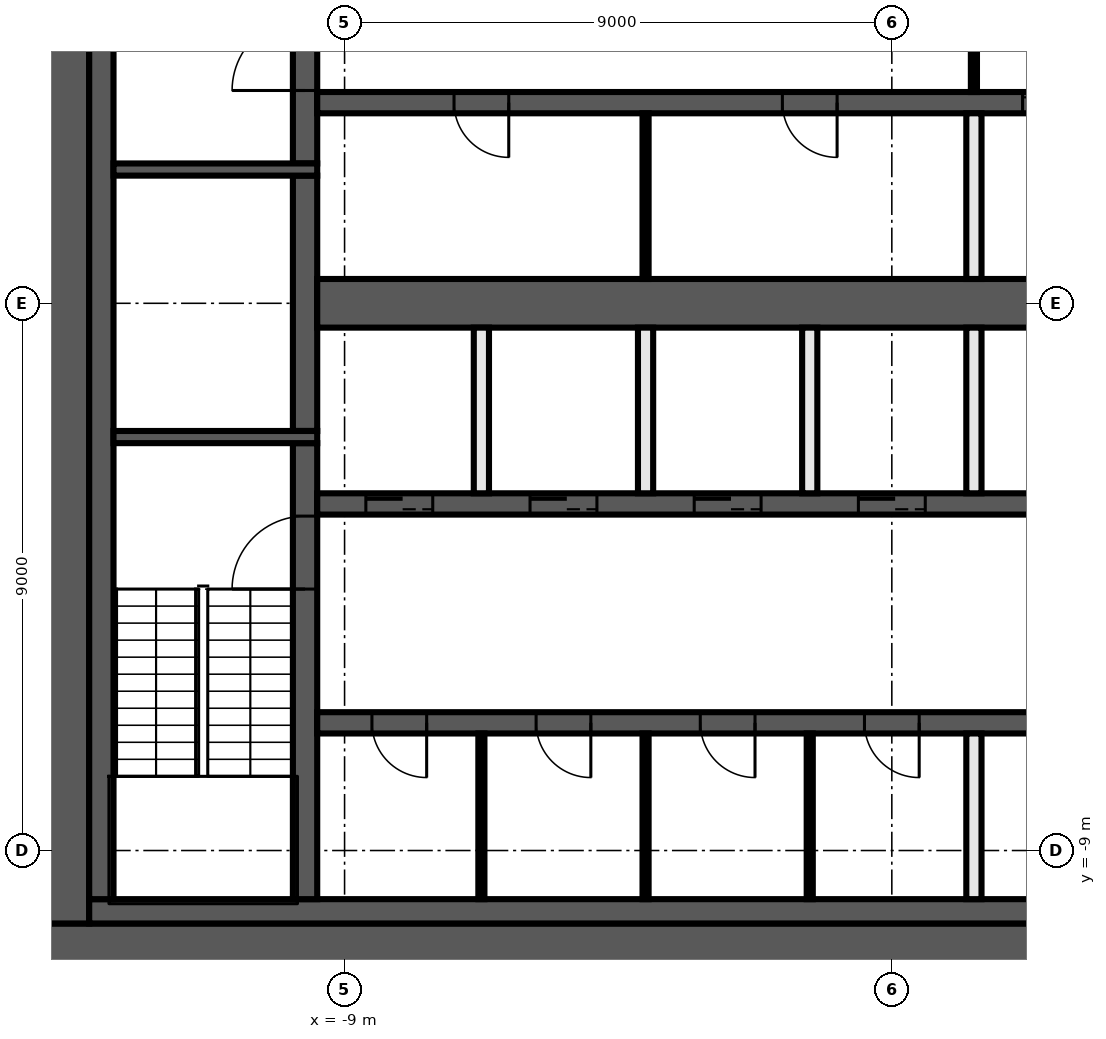
"""IFC4 building model, lengths in metres.
Left out: names, types, materials, properties, quantities, classifications, styles, units other than length and angle.
Written with IfcOpenShell. Run it as: python <this file> out.ifc"""

import sys

from ifc_helpers import new_model, si_unit, direction, frame, frame_2d, origin, place, context, subcontext, project, spatial, rectangle, extrude, element, fill, save


model = new_model("IFC4")
c1 = context("Model", 3, precision=1e-05, world=origin(), true_north=direction((0.0, 1.0)))
c2 = subcontext(c1, "Body", "Model", "MODEL_VIEW")
j1 = project(units=[si_unit("LENGTHUNIT", "METRE"), si_unit("PLANEANGLEUNIT", "RADIAN")], contexts=[c1])
p1 = place(None, origin())
s1 = spatial("IfcSite", under=j1, at=p1, CompositionType="ELEMENT")
p2 = place(p1, origin())
s2 = spatial("IfcBuilding", under=s1, at=p2, CompositionType="ELEMENT")
p3 = place(p2, frame((0.0, 0.0, 207.2)))
s3 = spatial("IfcBuildingStorey", under=s2, at=p3, CompositionType="ELEMENT", Elevation=207.2)
p4 = place(p3, frame((14.0, -10.6, 0.0), z_axis=(0.0, 0.0, 1.0), x_axis=(-1.0, 0.0, 0.0)))
e1 = element("IfcWall", 1, at=p4, inside=s3, PredefinedType="SHEAR", context=c2, shape_type="SweptSolid", body=[
    extrude(rectangle(XDim=28.0, YDim=0.8, at=frame_2d((14.0, 0.0))), origin(), (0.0, 0.0, 1.0), 3.82),
])
p5 = place(p4, frame((5.1, 0.0, 0.0)))
e2 = element("IfcOpeningElement", 2, at=p5, cuts=e1, PredefinedType="OPENING", context=c2, shape_type="SweptSolid", body=[
    extrude(rectangle(XDim=1.6, YDim=2.1, at=frame_2d((0.8, 1.05))), frame((0.0, 0.41, 0.0), z_axis=(0.0, -1.0, 0.0), x_axis=(1.0, 0.0, 0.0)), (0.0, 0.0, 1.0), 0.82),
])
p6 = place(p3, frame((-13.6, -10.2, 0.0), z_axis=(0.0, 0.0, 1.0), x_axis=(0.0, 1.0, 0.0)))
e3 = element("IfcWall", 3, at=p6, inside=s3, PredefinedType="SHEAR", context=c2, shape_type="SweptSolid", body=[
    extrude(rectangle(XDim=20.4, YDim=0.8, at=frame_2d((10.2, 0.0))), origin(), (0.0, 0.0, 1.0), 3.82),
])
p7 = place(p3, frame((6.9, -10.0, 0.0), z_axis=(0.0, 0.0, 1.0), x_axis=(-1.0, 0.0, 0.0)))
e4 = element("IfcWall", 4, at=p7, inside=s3, PredefinedType="SHEAR", context=c2, shape_type="SweptSolid", body=[
    extrude(rectangle(XDim=20.1, YDim=0.4, at=frame_2d((10.05, 0.0))), origin(), (0.0, 0.0, 1.0), 3.82),
])
p8 = place(p3, frame((-13.0, -9.8, 0.0), z_axis=(0.0, 0.0, 1.0), x_axis=(0.0, 1.0, 0.0)))
e5 = element("IfcWall", 5, at=p8, inside=s3, PredefinedType="SHEAR", context=c2, shape_type="SweptSolid", body=[
    extrude(rectangle(XDim=19.6, YDim=0.4, at=frame_2d((9.8, 0.0))), origin(), (0.0, 0.0, 1.0), 3.82),
])
p9 = place(p3, frame((-9.65, -9.8, 0.0), z_axis=(0.0, 0.0, 1.0), x_axis=(0.0, 1.0, 0.0)))
e6 = element("IfcWall", 6, at=p9, inside=s3, PredefinedType="SHEAR", context=c2, shape_type="SweptSolid", body=[
    extrude(rectangle(XDim=7.5, YDim=0.4, at=frame_2d((3.75, 0.0))), origin(), (0.0, 0.0, 1.0), 3.82),
])
p10 = place(p9, frame((5.1, 0.0, 0.0)))
e7 = element("IfcOpeningElement", 7, at=p10, cuts=e6, PredefinedType="OPENING", context=c2, shape_type="SweptSolid", body=[
    extrude(rectangle(XDim=1.2, YDim=2.1, at=frame_2d((0.6, 1.05))), frame((0.0, 0.21, 0.0), z_axis=(0.0, -1.0, 0.0), x_axis=(1.0, 0.0, 0.0)), (0.0, 0.0, 1.0), 0.42),
])
p11 = place(p3, frame((-9.65, -2.1, 0.0), z_axis=(0.0, 0.0, 1.0), x_axis=(0.0, 1.0, 0.0)))
e8 = element("IfcWall", 8, at=p11, inside=s3, PredefinedType="SHEAR", context=c2, shape_type="SweptSolid", body=[
    extrude(rectangle(XDim=4.2, YDim=0.4, at=frame_2d((2.1, 0.0))), origin(), (0.0, 0.0, 1.0), 3.82),
])
p12 = place(p3, frame((-9.65, 2.3, 0.0), z_axis=(0.0, 0.0, 1.0), x_axis=(0.0, 1.0, 0.0)))
e9 = element("IfcWall", 9, at=p12, inside=s3, PredefinedType="SHEAR", context=c2, shape_type="SweptSolid", body=[
    extrude(rectangle(XDim=7.5, YDim=0.4, at=frame_2d((3.75, 0.0))), origin(), (0.0, 0.0, 1.0), 3.82),
])
p13 = place(p12, frame((1.2, 0.0, 0.0)))
e10 = element("IfcOpeningElement", 10, at=p13, cuts=e9, PredefinedType="OPENING", context=c2, shape_type="SweptSolid", body=[
    extrude(rectangle(XDim=1.2, YDim=2.1, at=frame_2d((0.6, 1.05))), frame((0.0, 0.21, 0.0), z_axis=(0.0, -1.0, 0.0), x_axis=(1.0, 0.0, 0.0)), (0.0, 0.0, 1.0), 0.42),
])
for number, where, z_axis, x_axis in (
    (11, (-9.45, 2.2, 0.0), (0.0, 0.0, 1.0), (-1.0, 0.0, 0.0)),
    (12, (-9.45, -2.2, 0.0), (0.0, 0.0, 1.0), (-1.0, 0.0, 0.0)),
):
    element("IfcWall", number, at=place(p3, frame(where, z_axis=z_axis, x_axis=x_axis)), inside=s3, PredefinedType="SHEAR", context=c2, shape_type="SweptSolid", body=[
        extrude(rectangle(XDim=3.35, YDim=0.2, at=frame_2d((1.675, 0.0))), origin(), (0.0, 0.0, 1.0), 3.82),
    ])
p14 = place(p3, frame((9.45, 3.3, 0.0), z_axis=(0.0, 0.0, 1.0), x_axis=(-1.0, 0.0, 0.0)))
e13 = element("IfcWall", 13, at=p14, inside=s3, PredefinedType="SHEAR", context=c2, shape_type="SweptSolid", body=[
    extrude(rectangle(XDim=18.9, YDim=0.35, at=frame_2d((9.45, 0.0))), origin(), (0.0, 0.0, 1.0), 3.82),
])
p15 = place(p14, frame((6.2, 0.0, 0.0)))
e14 = element("IfcOpeningElement", 14, at=p15, cuts=e13, PredefinedType="OPENING", context=c2, shape_type="SweptSolid", body=[
    extrude(rectangle(XDim=1.1, YDim=2.1, at=frame_2d((0.55, 1.05))), frame((0.0, 0.185, 0.0), z_axis=(0.0, -1.0, 0.0), x_axis=(1.0, 0.0, 0.0)), (0.0, 0.0, 1.0), 0.37),
])
p16 = place(p14, frame((3.5, 0.0, 0.0)))
e15 = element("IfcOpeningElement", 15, at=p16, cuts=e13, PredefinedType="OPENING", context=c2, shape_type="SweptSolid", body=[
    extrude(rectangle(XDim=1.1, YDim=2.1, at=frame_2d((0.55, 1.05))), frame((0.0, 0.185, 0.0), z_axis=(0.0, -1.0, 0.0), x_axis=(1.0, 0.0, 0.0)), (0.0, 0.0, 1.0), 0.37),
])
p17 = place(p14, frame((0.9, 0.0, 0.0)))
e16 = element("IfcOpeningElement", 16, at=p17, cuts=e13, PredefinedType="OPENING", context=c2, shape_type="SweptSolid", body=[
    extrude(rectangle(XDim=0.9, YDim=2.1, at=frame_2d((0.45, 1.05))), frame((0.0, 0.185, 0.0), z_axis=(0.0, -1.0, 0.0), x_axis=(1.0, 0.0, 0.0)), (0.0, 0.0, 1.0), 0.37),
])
p18 = place(p14, frame((15.75, 0.0, 0.0)))
e17 = element("IfcOpeningElement", 17, at=p18, cuts=e13, PredefinedType="OPENING", context=c2, shape_type="SweptSolid", body=[
    extrude(rectangle(XDim=0.9, YDim=2.1, at=frame_2d((0.45, 1.05))), frame((0.0, 0.185, 0.0), z_axis=(0.0, -1.0, 0.0), x_axis=(1.0, 0.0, 0.0)), (0.0, 0.0, 1.0), 0.37),
])
p19 = place(p14, frame((10.35, 0.0, 0.0)))
e18 = element("IfcOpeningElement", 18, at=p19, cuts=e13, PredefinedType="OPENING", context=c2, shape_type="SweptSolid", body=[
    extrude(rectangle(XDim=0.9, YDim=2.1, at=frame_2d((0.45, 1.05))), frame((0.0, 0.185, 0.0), z_axis=(0.0, -1.0, 0.0), x_axis=(1.0, 0.0, 0.0)), (0.0, 0.0, 1.0), 0.37),
])
p20 = place(p3, frame((-9.45, -3.3, 0.0), z_axis=(0.0, 0.0, 1.0), x_axis=(1.0, 0.0, 0.0)))
e19 = element("IfcWall", 19, at=p20, inside=s3, PredefinedType="SHEAR", context=c2, shape_type="SweptSolid", body=[
    extrude(rectangle(XDim=18.9, YDim=0.35, at=frame_2d((9.45, 0.0))), origin(), (0.0, 0.0, 1.0), 3.82),
])
p21 = place(p20, frame((0.8, 0.0, 0.0)))
e20 = element("IfcOpeningElement", 20, at=p21, cuts=e19, PredefinedType="OPENING", context=c2, shape_type="SweptSolid", body=[
    extrude(rectangle(XDim=1.1, YDim=2.1, at=frame_2d((0.55, 1.05))), frame((0.0, 0.185, 0.0), z_axis=(0.0, -1.0, 0.0), x_axis=(1.0, 0.0, 0.0)), (0.0, 0.0, 1.0), 0.37),
])
p22 = place(p20, frame((3.5, 0.0, 0.0)))
e21 = element("IfcOpeningElement", 21, at=p22, cuts=e19, PredefinedType="OPENING", context=c2, shape_type="SweptSolid", body=[
    extrude(rectangle(XDim=1.1, YDim=2.1, at=frame_2d((0.55, 1.05))), frame((0.0, 0.185, 0.0), z_axis=(0.0, -1.0, 0.0), x_axis=(1.0, 0.0, 0.0)), (0.0, 0.0, 1.0), 0.37),
])
p23 = place(p20, frame((6.2, 0.0, 0.0)))
e22 = element("IfcOpeningElement", 22, at=p23, cuts=e19, PredefinedType="OPENING", context=c2, shape_type="SweptSolid", body=[
    extrude(rectangle(XDim=1.1, YDim=2.1, at=frame_2d((0.55, 1.05))), frame((0.0, 0.185, 0.0), z_axis=(0.0, -1.0, 0.0), x_axis=(1.0, 0.0, 0.0)), (0.0, 0.0, 1.0), 0.37),
])
p24 = place(p20, frame((8.9, 0.0, 0.0)))
e23 = element("IfcOpeningElement", 23, at=p24, cuts=e19, PredefinedType="OPENING", context=c2, shape_type="SweptSolid", body=[
    extrude(rectangle(XDim=1.1, YDim=2.1, at=frame_2d((0.55, 1.05))), frame((0.0, 0.185, 0.0), z_axis=(0.0, -1.0, 0.0), x_axis=(1.0, 0.0, 0.0)), (0.0, 0.0, 1.0), 0.37),
])
p25 = place(p20, frame((17.0, 0.0, 0.0)))
e24 = element("IfcOpeningElement", 24, at=p25, cuts=e19, PredefinedType="OPENING", context=c2, shape_type="SweptSolid", body=[
    extrude(rectangle(XDim=1.1, YDim=2.1, at=frame_2d((0.55, 1.05))), frame((0.0, 0.185, 0.0), z_axis=(0.0, -1.0, 0.0), x_axis=(1.0, 0.0, 0.0)), (0.0, 0.0, 1.0), 0.37),
])
p26 = place(p20, frame((11.7, 0.0, 0.0)))
e25 = element("IfcOpeningElement", 25, at=p26, cuts=e19, PredefinedType="OPENING", context=c2, shape_type="SweptSolid", body=[
    extrude(rectangle(XDim=0.9, YDim=2.1, at=frame_2d((0.45, 1.05))), frame((0.0, 0.185, 0.0), z_axis=(0.0, -1.0, 0.0), x_axis=(1.0, 0.0, 0.0)), (0.0, 0.0, 1.0), 0.37),
])
p27 = place(p20, frame((14.4, 0.0, 0.0)))
e26 = element("IfcOpeningElement", 26, at=p27, cuts=e19, PredefinedType="OPENING", context=c2, shape_type="SweptSolid", body=[
    extrude(rectangle(XDim=0.9, YDim=2.1, at=frame_2d((0.45, 1.05))), frame((0.0, 0.185, 0.0), z_axis=(0.0, -1.0, 0.0), x_axis=(1.0, 0.0, 0.0)), (0.0, 0.0, 1.0), 0.37),
])
p28 = place(p3, frame((9.45, -6.9, 0.0), z_axis=(0.0, 0.0, 1.0), x_axis=(-1.0, 0.0, 0.0)))
e27 = element("IfcWall", 27, at=p28, inside=s3, PredefinedType="SHEAR", context=c2, shape_type="SweptSolid", body=[
    extrude(rectangle(XDim=18.9, YDim=0.35, at=frame_2d((9.45, 0.0))), origin(), (0.0, 0.0, 1.0), 3.82),
])
p29 = place(p28, frame((0.75, 0.0, 0.0)))
e28 = element("IfcOpeningElement", 28, at=p29, cuts=e27, PredefinedType="OPENING", context=c2, shape_type="SweptSolid", body=[
    extrude(rectangle(XDim=1.2, YDim=2.1, at=frame_2d((0.6, 1.05))), frame((0.0, 0.185, 0.0), z_axis=(0.0, -1.0, 0.0), x_axis=(1.0, 0.0, 0.0)), (0.0, 0.0, 1.0), 0.37),
])
p30 = place(p28, frame((17.1, 0.0, 0.0)))
e29 = element("IfcOpeningElement", 29, at=p30, cuts=e27, PredefinedType="OPENING", context=c2, shape_type="SweptSolid", body=[
    extrude(rectangle(XDim=0.9, YDim=2.1, at=frame_2d((0.45, 1.05))), frame((0.0, 0.185, 0.0), z_axis=(0.0, -1.0, 0.0), x_axis=(1.0, 0.0, 0.0)), (0.0, 0.0, 1.0), 0.37),
])
p31 = place(p28, frame((14.4, 0.0, 0.0)))
e30 = element("IfcOpeningElement", 30, at=p31, cuts=e27, PredefinedType="OPENING", context=c2, shape_type="SweptSolid", body=[
    extrude(rectangle(XDim=0.9, YDim=2.1, at=frame_2d((0.45, 1.05))), frame((0.0, 0.185, 0.0), z_axis=(0.0, -1.0, 0.0), x_axis=(1.0, 0.0, 0.0)), (0.0, 0.0, 1.0), 0.37),
])
p32 = place(p28, frame((11.7, 0.0, 0.0)))
e31 = element("IfcOpeningElement", 31, at=p32, cuts=e27, PredefinedType="OPENING", context=c2, shape_type="SweptSolid", body=[
    extrude(rectangle(XDim=0.9, YDim=2.1, at=frame_2d((0.45, 1.05))), frame((0.0, 0.185, 0.0), z_axis=(0.0, -1.0, 0.0), x_axis=(1.0, 0.0, 0.0)), (0.0, 0.0, 1.0), 0.37),
])
p33 = place(p28, frame((9.0, 0.0, 0.0)))
e32 = element("IfcOpeningElement", 32, at=p33, cuts=e27, PredefinedType="OPENING", context=c2, shape_type="SweptSolid", body=[
    extrude(rectangle(XDim=0.9, YDim=2.1, at=frame_2d((0.45, 1.05))), frame((0.0, 0.185, 0.0), z_axis=(0.0, -1.0, 0.0), x_axis=(1.0, 0.0, 0.0)), (0.0, 0.0, 1.0), 0.37),
])
p34 = place(p3, frame((-9.45, 0.0, 0.0), z_axis=(0.0, 0.0, 1.0), x_axis=(1.0, 0.0, 0.0)))
e33 = element("IfcWall", 33, at=p34, inside=s3, PredefinedType="SHEAR", context=c2, shape_type="SweptSolid", body=[
    extrude(rectangle(XDim=18.9, YDim=0.8, at=frame_2d((9.45, 0.0))), origin(), (0.0, 0.0, 1.0), 3.82),
])
p35 = place(p3, frame((1.35, 6.725, 0.0), z_axis=(0.0, 0.0, 1.0), x_axis=(0.0, -1.0, 0.0)))
e34 = element("IfcWall", 34, at=p35, inside=s3, PredefinedType="PARTITIONING", context=c2, shape_type="SweptSolid", body=[
    extrude(rectangle(XDim=3.25, YDim=0.1, at=frame_2d((1.625, 0.0))), origin(), (0.0, 0.0, 1.0), 3.82),
])
p36 = place(p35, frame((1.025, 0.0, 0.0)))
e35 = element("IfcOpeningElement", 35, at=p36, cuts=e34, PredefinedType="OPENING", context=c2, shape_type="SweptSolid", body=[
    extrude(rectangle(XDim=1.2, YDim=2.1, at=frame_2d((0.6, 1.05))), frame((0.0, 0.06, 0.0), z_axis=(0.0, -1.0, 0.0), x_axis=(1.0, 0.0, 0.0)), (0.0, 0.0, 1.0), 0.12),
])
for number, where, z_axis, x_axis in (
    (36, (1.35, -9.8, 0.0), (0.0, 0.0, 1.0), (0.0, 1.0, 0.0)),
    (37, (1.35, -3.125, 0.0), (0.0, 0.0, 1.0), (0.0, 1.0, 0.0)),
    (38, (1.35, 0.4, 0.0), (0.0, 0.0, 1.0), (0.0, 1.0, 0.0)),
):
    element("IfcWall", number, at=place(p3, frame(where, z_axis=z_axis, x_axis=x_axis)), inside=s3, PredefinedType="SOLIDWALL", context=c2, shape_type="SweptSolid", body=[
        extrude(rectangle(XDim=2.725, YDim=0.25, at=frame_2d((1.363, 0.0))), origin(), (0.0, 0.0, 1.0), 3.82),
    ])
p37 = place(p3, frame((-1.35, -9.8, 0.0), z_axis=(0.0, 0.0, 1.0), x_axis=(0.0, 1.0, 0.0)))
e39 = element("IfcWall", 39, at=p37, inside=s3, PredefinedType="PARTITIONING", context=c2, shape_type="SweptSolid", body=[
    extrude(rectangle(XDim=2.725, YDim=0.1, at=frame_2d((1.363, 0.0))), origin(), (0.0, 0.0, 1.0), 3.82),
])
p38 = place(p3, frame((-1.35, -3.125, 0.0), z_axis=(0.0, 0.0, 1.0), x_axis=(0.0, 1.0, 0.0)))
e40 = element("IfcWall", 40, at=p38, inside=s3, PredefinedType="SOLIDWALL", context=c2, shape_type="SweptSolid", body=[
    extrude(rectangle(XDim=2.725, YDim=0.25, at=frame_2d((1.363, 0.0))), origin(), (0.0, 0.0, 1.0), 3.82),
])
for number, where, z_axis, x_axis in (
    (41, (-4.05, -9.8, 0.0), (0.0, 0.0, 1.0), (0.0, 1.0, 0.0)),
    (42, (-4.05, 0.4, 0.0), (0.0, 0.0, 1.0), (0.0, 1.0, 0.0)),
):
    element("IfcWall", number, at=place(p3, frame(where, z_axis=z_axis, x_axis=x_axis)), inside=s3, PredefinedType="PARTITIONING", context=c2, shape_type="SweptSolid", body=[
        extrude(rectangle(XDim=2.725, YDim=0.1, at=frame_2d((1.363, 0.0))), origin(), (0.0, 0.0, 1.0), 3.82),
    ])
p39 = place(p3, frame((-4.05, -3.125, 0.0), z_axis=(0.0, 0.0, 1.0), x_axis=(0.0, 1.0, 0.0)))
e43 = element("IfcWall", 43, at=p39, inside=s3, PredefinedType="SOLIDWALL", context=c2, shape_type="SweptSolid", body=[
    extrude(rectangle(XDim=2.725, YDim=0.25, at=frame_2d((1.363, 0.0))), origin(), (0.0, 0.0, 1.0), 3.82),
])
p40 = place(p3, frame((-6.75, -9.8, 0.0), z_axis=(0.0, 0.0, 1.0), x_axis=(0.0, 1.0, 0.0)))
e44 = element("IfcWall", 44, at=p40, inside=s3, PredefinedType="PARTITIONING", context=c2, shape_type="SweptSolid", body=[
    extrude(rectangle(XDim=2.725, YDim=0.1, at=frame_2d((1.363, 0.0))), origin(), (0.0, 0.0, 1.0), 3.82),
])
p41 = place(p3, frame((-6.75, -3.125, 0.0), z_axis=(0.0, 0.0, 1.0), x_axis=(0.0, 1.0, 0.0)))
e45 = element("IfcWall", 45, at=p41, inside=s3, PredefinedType="SOLIDWALL", context=c2, shape_type="SweptSolid", body=[
    extrude(rectangle(XDim=2.725, YDim=0.25, at=frame_2d((1.363, 0.0))), origin(), (0.0, 0.0, 1.0), 3.82),
])
p42 = place(p15, origin())
e46 = element("IfcDoor", 46, at=p42, inside=s3, OperationType="DOUBLE_DOOR_SLIDING", PredefinedType="DOOR", context=c2, shape_type="SweptSolid", body=[
    extrude(rectangle(XDim=1.1, YDim=2.1, at=frame_2d((0.55, 1.05))), frame((0.0, 0.025, 0.0), z_axis=(0.0, -1.0, 0.0), x_axis=(1.0, 0.0, 0.0)), (0.0, 0.0, 1.0), 0.05),
])
fill(e14, e46)
p43 = place(p21, origin())
e47 = element("IfcDoor", 47, at=p43, inside=s3, OperationType="DOUBLE_DOOR_SLIDING", PredefinedType="DOOR", context=c2, shape_type="SweptSolid", body=[
    extrude(rectangle(XDim=1.1, YDim=2.1, at=frame_2d((0.55, 1.05))), frame((0.0, 0.025, 0.0), z_axis=(0.0, -1.0, 0.0), x_axis=(1.0, 0.0, 0.0)), (0.0, 0.0, 1.0), 0.05),
])
fill(e20, e47)
p44 = place(p22, origin())
e48 = element("IfcDoor", 48, at=p44, inside=s3, OperationType="DOUBLE_DOOR_SLIDING", PredefinedType="DOOR", context=c2, shape_type="SweptSolid", body=[
    extrude(rectangle(XDim=1.1, YDim=2.1, at=frame_2d((0.55, 1.05))), frame((0.0, 0.025, 0.0), z_axis=(0.0, -1.0, 0.0), x_axis=(1.0, 0.0, 0.0)), (0.0, 0.0, 1.0), 0.05),
])
fill(e21, e48)
p45 = place(p23, origin())
e49 = element("IfcDoor", 49, at=p45, inside=s3, OperationType="DOUBLE_DOOR_SLIDING", PredefinedType="DOOR", context=c2, shape_type="SweptSolid", body=[
    extrude(rectangle(XDim=1.1, YDim=2.1, at=frame_2d((0.55, 1.05))), frame((0.0, 0.025, 0.0), z_axis=(0.0, -1.0, 0.0), x_axis=(1.0, 0.0, 0.0)), (0.0, 0.0, 1.0), 0.05),
])
fill(e22, e49)
p46 = place(p24, origin())
e50 = element("IfcDoor", 50, at=p46, inside=s3, OperationType="DOUBLE_DOOR_SLIDING", PredefinedType="DOOR", context=c2, shape_type="SweptSolid", body=[
    extrude(rectangle(XDim=1.1, YDim=2.1, at=frame_2d((0.55, 1.05))), frame((0.0, 0.025, 0.0), z_axis=(0.0, -1.0, 0.0), x_axis=(1.0, 0.0, 0.0)), (0.0, 0.0, 1.0), 0.05),
])
fill(e23, e50)
p47 = place(p18, origin())
e51 = element("IfcDoor", 51, at=p47, inside=s3, OperationType="SINGLE_SWING_LEFT", PredefinedType="DOOR", context=c2, shape_type="SweptSolid", body=[
    extrude(rectangle(XDim=0.9, YDim=2.1, at=frame_2d((0.45, 1.05))), frame((0.0, 0.025, 0.0), z_axis=(0.0, -1.0, 0.0), x_axis=(1.0, 0.0, 0.0)), (0.0, 0.0, 1.0), 0.05),
])
fill(e17, e51)
p48 = place(p19, origin())
e52 = element("IfcDoor", 52, at=p48, inside=s3, OperationType="SINGLE_SWING_RIGHT", PredefinedType="DOOR", context=c2, shape_type="SweptSolid", body=[
    extrude(rectangle(XDim=0.9, YDim=2.1, at=frame_2d((0.45, 1.05))), frame((0.0, 0.025, 0.0), z_axis=(0.0, -1.0, 0.0), x_axis=(1.0, 0.0, 0.0)), (0.0, 0.0, 1.0), 0.05),
])
fill(e18, e52)
p49 = place(p30, origin())
e53 = element("IfcDoor", 53, at=p49, inside=s3, OperationType="SINGLE_SWING_LEFT", PredefinedType="DOOR", context=c2, shape_type="SweptSolid", body=[
    extrude(rectangle(XDim=0.9, YDim=2.1, at=frame_2d((0.45, 1.05))), frame((0.0, 0.025, 0.0), z_axis=(0.0, -1.0, 0.0), x_axis=(1.0, 0.0, 0.0)), (0.0, 0.0, 1.0), 0.05),
])
fill(e29, e53)
p50 = place(p31, origin())
e54 = element("IfcDoor", 54, at=p50, inside=s3, OperationType="SINGLE_SWING_RIGHT", PredefinedType="DOOR", context=c2, shape_type="SweptSolid", body=[
    extrude(rectangle(XDim=0.9, YDim=2.1, at=frame_2d((0.45, 1.05))), frame((0.0, 0.025, 0.0), z_axis=(0.0, -1.0, 0.0), x_axis=(1.0, 0.0, 0.0)), (0.0, 0.0, 1.0), 0.05),
])
fill(e30, e54)
p51 = place(p32, origin())
e55 = element("IfcDoor", 55, at=p51, inside=s3, OperationType="SINGLE_SWING_LEFT", PredefinedType="DOOR", context=c2, shape_type="SweptSolid", body=[
    extrude(rectangle(XDim=0.9, YDim=2.1, at=frame_2d((0.45, 1.05))), frame((0.0, 0.025, 0.0), z_axis=(0.0, -1.0, 0.0), x_axis=(1.0, 0.0, 0.0)), (0.0, 0.0, 1.0), 0.05),
])
fill(e31, e55)
p52 = place(p33, origin())
e56 = element("IfcDoor", 56, at=p52, inside=s3, OperationType="SINGLE_SWING_RIGHT", PredefinedType="DOOR", context=c2, shape_type="SweptSolid", body=[
    extrude(rectangle(XDim=0.9, YDim=2.1, at=frame_2d((0.45, 1.05))), frame((0.0, 0.025, 0.0), z_axis=(0.0, -1.0, 0.0), x_axis=(1.0, 0.0, 0.0)), (0.0, 0.0, 1.0), 0.05),
])
fill(e32, e56)
p53 = place(p13, origin())
e57 = element("IfcDoor", 57, at=p53, inside=s3, OperationType="SINGLE_SWING_RIGHT", PredefinedType="DOOR", context=c2, shape_type="SweptSolid", body=[
    extrude(rectangle(XDim=1.2, YDim=2.1, at=frame_2d((0.6, 1.05))), frame((0.0, 0.025, 0.0), z_axis=(0.0, -1.0, 0.0), x_axis=(1.0, 0.0, 0.0)), (0.0, 0.0, 1.0), 0.05),
])
fill(e10, e57)
p54 = place(p10, origin())
e58 = element("IfcDoor", 58, at=p54, inside=s3, OperationType="SINGLE_SWING_LEFT", PredefinedType="DOOR", context=c2, shape_type="SweptSolid", body=[
    extrude(rectangle(XDim=1.2, YDim=2.1, at=frame_2d((0.6, 1.05))), frame((0.0, 0.025, 0.0), z_axis=(0.0, -1.0, 0.0), x_axis=(1.0, 0.0, 0.0)), (0.0, 0.0, 1.0), 0.05),
])
fill(e7, e58)
save(model, sys.argv[1])
